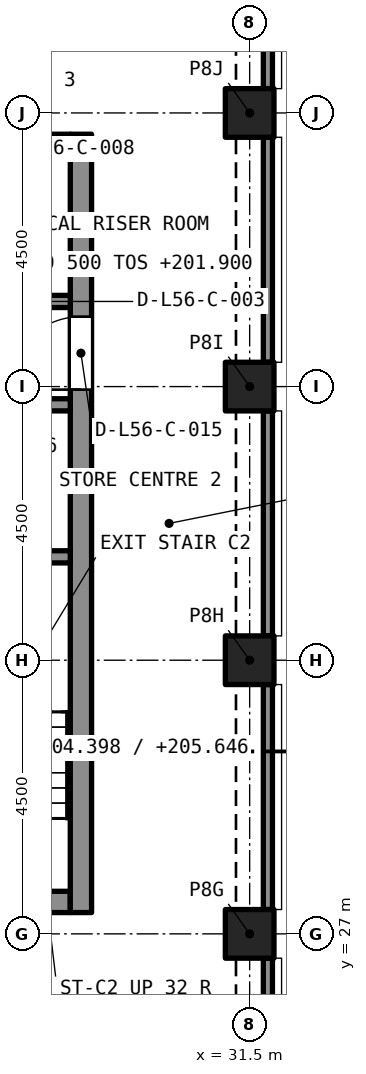
"""IFC4 building model, lengths in metres.
Left out: names, types, materials, properties, quantities, classifications, styles, units other than length and angle.
Written with IfcOpenShell. Run it as: python <this file> out.ifc"""

import sys

from ifc_helpers import new_model, si_unit, direction, frame, frame_2d, origin, origin_2d, place, context, subcontext, project, spatial, rectangle, extrude, element, fill, save


model = new_model("IFC4")
c1 = context("Model", 3, precision=1e-05, world=origin(), true_north=direction((0.0, 1.0)))
c2 = subcontext(c1, "Body", "Model", "MODEL_VIEW")
j1 = project(units=[si_unit("LENGTHUNIT", "METRE"), si_unit("PLANEANGLEUNIT", "RADIAN")], contexts=[c1])
p1 = place(None, origin())
s1 = spatial("IfcSite", under=j1, at=p1, CompositionType="ELEMENT")
p2 = place(p1, origin())
s2 = spatial("IfcBuilding", under=s1, at=p2, CompositionType="ELEMENT")
p3 = place(p2, frame((0.0, 0.0, 201.9)))
s3 = spatial("IfcBuildingStorey", under=s2, at=p3, CompositionType="ELEMENT", Elevation=201.9)
for number, where, z_axis, x_axis in (
    (1, (31.5, 27.0, 0.0), (0.0, 0.0, 1.0), (1.0, 0.0, 0.0)),
    (2, (31.5, 31.5, 0.0), (0.0, 0.0, 1.0), (1.0, 0.0, 0.0)),
    (3, (31.5, 36.0, 0.0), (0.0, 0.0, 1.0), (1.0, 0.0, 0.0)),
    (4, (31.5, 40.5, 0.0), (0.0, 0.0, 1.0), (1.0, 0.0, 0.0)),
):
    element("IfcColumn", number, at=place(p3, frame(where, z_axis=z_axis, x_axis=x_axis)), inside=s3, PredefinedType="COLUMN", context=c2, shape_type="SweptSolid", body=[
        extrude(rectangle(XDim=0.8, YDim=0.8, at=origin_2d()), origin(), (0.0, 0.0, 1.0), 4.995),
    ])
p4 = place(p3, frame((20.95, 27.525, 0.0), z_axis=(0.0, 0.0, 1.0), x_axis=(1.0, 0.0, 0.0)))
e5 = element("IfcWall", 5, at=p4, inside=s3, PredefinedType="SOLIDWALL", context=c2, shape_type="SweptSolid", body=[
    extrude(rectangle(XDim=7.6, YDim=0.35, at=frame_2d((3.8, 0.0))), origin(), (0.0, 0.0, 1.0), 4.995),
])
p5 = place(p4, frame((0.725, 0.0, 0.0)))
e6 = element("IfcOpeningElement", 6, at=p5, cuts=e5, PredefinedType="OPENING", context=c2, shape_type="SweptSolid", body=[
    extrude(rectangle(XDim=1.1, YDim=2.1, at=frame_2d((0.55, 1.05))), frame((0.0, 0.185, 0.0), z_axis=(0.0, -1.0, 0.0), x_axis=(1.0, 0.0, 0.0)), (0.0, 0.0, 1.0), 0.37),
])
p6 = place(p4, frame((3.25, 0.0, 0.0)))
e7 = element("IfcOpeningElement", 7, at=p6, cuts=e5, PredefinedType="OPENING", context=c2, shape_type="SweptSolid", body=[
    extrude(rectangle(XDim=1.1, YDim=2.1, at=frame_2d((0.55, 1.05))), frame((0.0, 0.185, 0.0), z_axis=(0.0, -1.0, 0.0), x_axis=(1.0, 0.0, 0.0)), (0.0, 0.0, 1.0), 0.37),
])
p7 = place(p4, frame((5.775, 0.0, 0.0)))
e8 = element("IfcOpeningElement", 8, at=p7, cuts=e5, PredefinedType="OPENING", context=c2, shape_type="SweptSolid", body=[
    extrude(rectangle(XDim=1.1, YDim=2.1, at=frame_2d((0.55, 1.05))), frame((0.0, 0.185, 0.0), z_axis=(0.0, -1.0, 0.0), x_axis=(1.0, 0.0, 0.0)), (0.0, 0.0, 1.0), 0.37),
])
p8 = place(p3, frame((20.95, 39.975, 0.0), z_axis=(0.0, 0.0, 1.0), x_axis=(1.0, 0.0, 0.0)))
e9 = element("IfcWall", 9, at=p8, inside=s3, PredefinedType="SOLIDWALL", context=c2, shape_type="SweptSolid", body=[
    extrude(rectangle(XDim=7.6, YDim=0.35, at=frame_2d((3.8, 0.0))), origin(), (0.0, 0.0, 1.0), 4.995),
])
p9 = place(p3, frame((28.725, 27.35, 0.0), z_axis=(0.0, 0.0, 1.0), x_axis=(0.0, 1.0, 0.0)))
e10 = element("IfcWall", 10, at=p9, inside=s3, PredefinedType="SOLIDWALL", context=c2, shape_type="SweptSolid", body=[
    extrude(rectangle(XDim=12.8, YDim=0.35, at=frame_2d((6.4, 0.0))), origin(), (0.0, 0.0, 1.0), 4.995),
])
p10 = place(p9, frame((8.6, 0.0, 0.0)))
e11 = element("IfcOpeningElement", 11, at=p10, cuts=e10, PredefinedType="OPENING", context=c2, shape_type="SweptSolid", body=[
    extrude(rectangle(XDim=1.2, YDim=2.1, at=frame_2d((0.6, 1.05))), frame((0.0, 0.185, 0.0), z_axis=(0.0, -1.0, 0.0), x_axis=(1.0, 0.0, 0.0)), (0.0, 0.0, 1.0), 0.37),
])
for number, where, z_axis, x_axis in (
    (12, (31.8, 26.6, 0.0), (0.0, 0.0, 1.0), (0.0, -1.0, 0.0)),
    (13, (31.8, 31.1, 0.0), (0.0, 0.0, 1.0), (0.0, -1.0, 0.0)),
    (14, (31.8, 35.6, 0.0), (0.0, 0.0, 1.0), (0.0, -1.0, 0.0)),
    (15, (31.8, 40.1, 0.0), (0.0, 0.0, 1.0), (0.0, -1.0, 0.0)),
    (16, (31.8, 44.6, 0.0), (0.0, 0.0, 1.0), (0.0, -1.0, 0.0)),
):
    element("IfcWall", number, at=place(p3, frame(where, z_axis=z_axis, x_axis=x_axis)), inside=s3, PredefinedType="SOLIDWALL", context=c2, shape_type="SweptSolid", body=[
        extrude(rectangle(XDim=3.7, YDim=0.15, at=frame_2d((1.85, 0.0))), origin(), (0.0, 0.0, 1.0), 4.995),
    ])
p11 = place(p3, frame((20.95, 33.2, 0.0), z_axis=(0.0, 0.0, 1.0), x_axis=(1.0, 0.0, 0.0)))
e17 = element("IfcWall", 17, at=p11, inside=s3, PredefinedType="SOLIDWALL", context=c2, shape_type="SweptSolid", body=[
    extrude(rectangle(XDim=7.6, YDim=0.2, at=frame_2d((3.8, 0.0))), origin(), (0.0, 0.0, 1.0), 4.695),
])
p12 = place(p11, frame((3.35, 0.0, 0.0)))
e18 = element("IfcOpeningElement", 18, at=p12, cuts=e17, PredefinedType="OPENING", context=c2, shape_type="SweptSolid", body=[
    extrude(rectangle(XDim=0.9, YDim=2.1, at=frame_2d((0.45, 1.05))), frame((0.0, 0.11, 0.0), z_axis=(0.0, -1.0, 0.0), x_axis=(1.0, 0.0, 0.0)), (0.0, 0.0, 1.0), 0.22),
])
p13 = place(p3, frame((20.95, 35.7, 0.0), z_axis=(0.0, 0.0, 1.0), x_axis=(1.0, 0.0, 0.0)))
e19 = element("IfcWall", 19, at=p13, inside=s3, PredefinedType="SOLIDWALL", context=c2, shape_type="SweptSolid", body=[
    extrude(rectangle(XDim=7.6, YDim=0.2, at=frame_2d((3.8, 0.0))), origin(), (0.0, 0.0, 1.0), 4.695),
])
p14 = place(p13, frame((0.137, 0.0, 0.0)))
e20 = element("IfcOpeningElement", 20, at=p14, cuts=e19, PredefinedType="OPENING", context=c2, shape_type="SweptSolid", body=[
    extrude(rectangle(XDim=0.9, YDim=2.1, at=frame_2d((0.45, 1.05))), frame((0.0, 0.11, 0.0), z_axis=(0.0, -1.0, 0.0), x_axis=(1.0, 0.0, 0.0)), (0.0, 0.0, 1.0), 0.22),
])
p15 = place(p13, frame((1.512, 0.0, 0.0)))
e21 = element("IfcOpeningElement", 21, at=p15, cuts=e19, PredefinedType="OPENING", context=c2, shape_type="SweptSolid", body=[
    extrude(rectangle(XDim=0.9, YDim=2.1, at=frame_2d((0.45, 1.05))), frame((0.0, 0.11, 0.0), z_axis=(0.0, -1.0, 0.0), x_axis=(1.0, 0.0, 0.0)), (0.0, 0.0, 1.0), 0.22),
])
p16 = place(p13, frame((5.875, 0.0, 0.0)))
e22 = element("IfcOpeningElement", 22, at=p16, cuts=e19, PredefinedType="OPENING", context=c2, shape_type="SweptSolid", body=[
    extrude(rectangle(XDim=0.9, YDim=2.1, at=frame_2d((0.45, 1.05))), frame((0.0, 0.11, 0.0), z_axis=(0.0, -1.0, 0.0), x_axis=(1.0, 0.0, 0.0)), (0.0, 0.0, 1.0), 0.22),
])
p17 = place(p3, frame((20.95, 37.4, 0.0), z_axis=(0.0, 0.0, 1.0), x_axis=(1.0, 0.0, 0.0)))
e23 = element("IfcWall", 23, at=p17, inside=s3, PredefinedType="SOLIDWALL", context=c2, shape_type="SweptSolid", body=[
    extrude(rectangle(XDim=7.6, YDim=0.2, at=frame_2d((3.8, 0.0))), origin(), (0.0, 0.0, 1.0), 4.695),
])
p18 = place(p17, frame((6.15, 0.0, 0.0)))
e24 = element("IfcOpeningElement", 24, at=p18, cuts=e23, PredefinedType="OPENING", context=c2, shape_type="SweptSolid", body=[
    extrude(rectangle(XDim=0.7, YDim=2.1, at=frame_2d((0.35, 1.05))), frame((0.0, 0.11, 0.0), z_axis=(0.0, -1.0, 0.0), x_axis=(1.0, 0.0, 0.0)), (0.0, 0.0, 1.0), 0.22),
])
p19 = place(p17, frame((0.8, 0.0, 0.0)))
e25 = element("IfcOpeningElement", 25, at=p19, cuts=e23, PredefinedType="OPENING", context=c2, shape_type="SweptSolid", body=[
    extrude(rectangle(XDim=0.9, YDim=2.1, at=frame_2d((0.45, 1.05))), frame((0.0, 0.11, 0.0), z_axis=(0.0, -1.0, 0.0), x_axis=(1.0, 0.0, 0.0)), (0.0, 0.0, 1.0), 0.22),
])
p20 = place(p17, frame((2.825, 0.0, 0.0)))
e26 = element("IfcOpeningElement", 26, at=p20, cuts=e23, PredefinedType="OPENING", context=c2, shape_type="SweptSolid", body=[
    extrude(rectangle(XDim=0.9, YDim=2.1, at=frame_2d((0.45, 1.05))), frame((0.0, 0.11, 0.0), z_axis=(0.0, -1.0, 0.0), x_axis=(1.0, 0.0, 0.0)), (0.0, 0.0, 1.0), 0.22),
])
p21 = place(p17, frame((4.175, 0.0, 0.0)))
e27 = element("IfcOpeningElement", 27, at=p21, cuts=e23, PredefinedType="OPENING", context=c2, shape_type="SweptSolid", body=[
    extrude(rectangle(XDim=0.9, YDim=2.1, at=frame_2d((0.45, 1.05))), frame((0.0, 0.11, 0.0), z_axis=(0.0, -1.0, 0.0), x_axis=(1.0, 0.0, 0.0)), (0.0, 0.0, 1.0), 0.22),
])
p22 = place(p10, origin())
e28 = element("IfcDoor", 28, at=p22, inside=s3, OperationType="SINGLE_SWING_LEFT", PredefinedType="DOOR", context=c2, shape_type="SweptSolid", body=[
    extrude(rectangle(XDim=1.2, YDim=2.1, at=frame_2d((0.6, 1.05))), frame((0.0, 0.025, 0.0), z_axis=(0.0, -1.0, 0.0), x_axis=(1.0, 0.0, 0.0)), (0.0, 0.0, 1.0), 0.05),
])
fill(e11, e28)
save(model, sys.argv[1])
